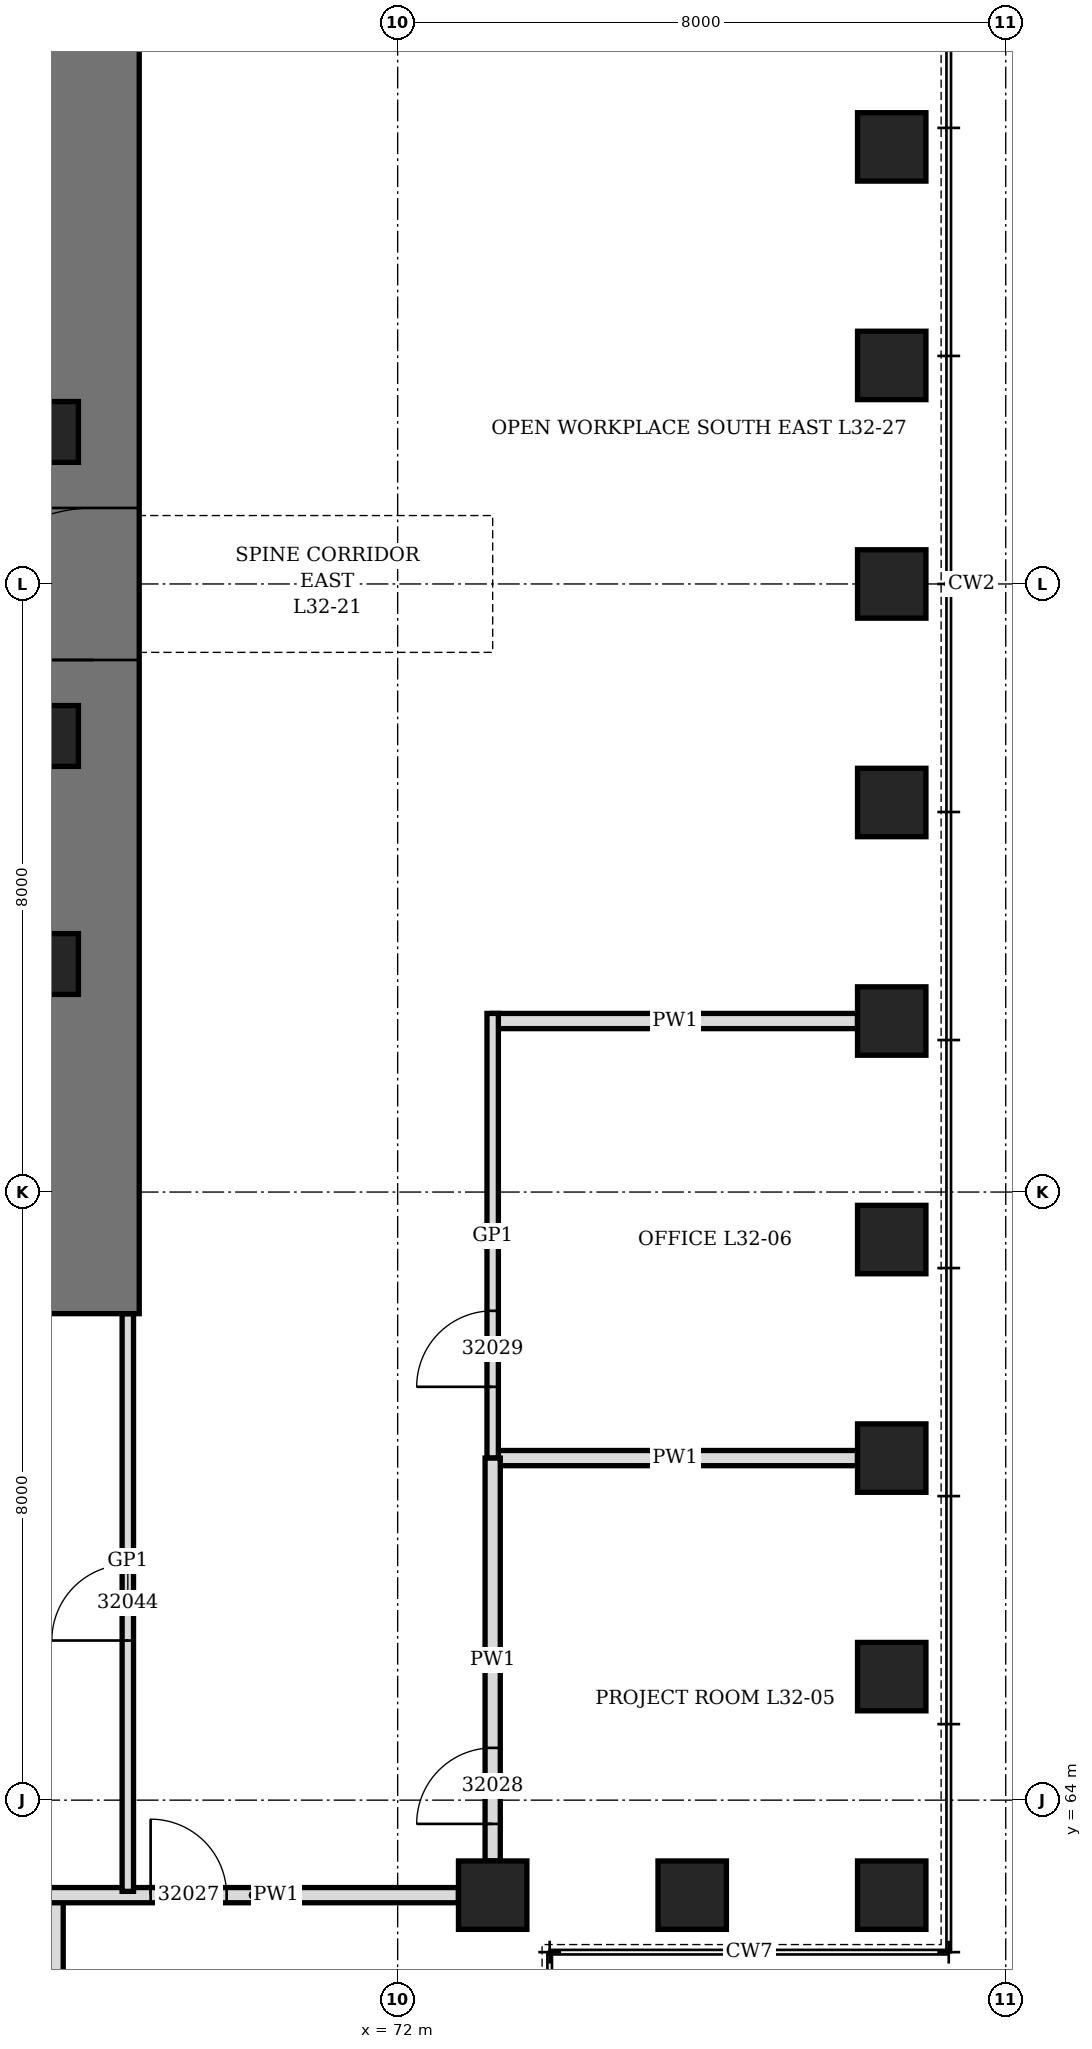
"""IFC4 building model, lengths in metres.
Left out: names, types, materials, properties, quantities, classifications, styles, units other than length and angle.
Written with IfcOpenShell. Run it as: python <this file> out.ifc"""

import sys

from ifc_helpers import new_model, si_unit, direction, frame, frame_2d, origin, origin_2d, place, context, subcontext, project, spatial, rectangle, hollow_rectangle, extrude, element, fill, save


model = new_model("IFC4")
c1 = context("Model", 3, precision=1e-05, world=origin(), true_north=direction((0.0, 1.0)))
c2 = subcontext(c1, "Body", "Model", "MODEL_VIEW")
j1 = project(units=[si_unit("LENGTHUNIT", "METRE"), si_unit("PLANEANGLEUNIT", "RADIAN")], contexts=[c1])
p1 = place(None, origin())
s1 = spatial("IfcSite", under=j1, at=p1, CompositionType="ELEMENT")
p2 = place(p1, origin())
s2 = spatial("IfcBuilding", under=s1, at=p2, CompositionType="ELEMENT")
p3 = place(p2, frame((0.0, 0.0, 145.9)))
s3 = spatial("IfcBuildingStorey", under=s2, at=p3, CompositionType="ELEMENT", Elevation=145.9)
for number, where, z_axis, x_axis in (
    (1, (73.25, 62.75, 0.0), (0.0, 0.0, 1.0), (1.0, 0.0, 0.0)),
    (2, (75.875, 62.75, 0.0), (0.0, 0.0, 1.0), (1.0, 0.0, 0.0)),
    (3, (78.5, 62.75, 0.0), (0.0, 0.0, 1.0), (0.0, 1.0, 0.0)),
    (4, (78.5, 65.625, 0.0), (0.0, 0.0, 1.0), (0.0, 1.0, 0.0)),
    (5, (78.5, 68.5, 0.0), (0.0, 0.0, 1.0), (0.0, 1.0, 0.0)),
    (6, (78.5, 71.375, 0.0), (0.0, 0.0, 1.0), (0.0, 1.0, 0.0)),
    (7, (78.5, 74.25, 0.0), (0.0, 0.0, 1.0), (0.0, 1.0, 0.0)),
    (8, (78.5, 77.125, 0.0), (0.0, 0.0, 1.0), (0.0, 1.0, 0.0)),
    (9, (78.5, 80.0, 0.0), (0.0, 0.0, 1.0), (0.0, 1.0, 0.0)),
    (10, (78.5, 82.875, 0.0), (0.0, 0.0, 1.0), (0.0, 1.0, 0.0)),
    (11, (78.5, 85.75, 0.0), (0.0, 0.0, 1.0), (0.0, 1.0, 0.0)),
):
    element("IfcColumn", number, at=place(p3, frame(where, z_axis=z_axis, x_axis=x_axis)), inside=s3, PredefinedType="COLUMN", context=c2, shape_type="SweptSolid", body=[
        extrude(hollow_rectangle(XDim=0.9, YDim=0.9, WallThickness=0.12, at=origin_2d()), origin(), (0.0, 0.0, 1.0), 4.2),
    ])
p4 = place(p3, frame((68.0, 70.4, 0.0), z_axis=(0.0, 0.0, 1.0), x_axis=(0.0, 1.0, 0.0)))
e12 = element("IfcWall", 12, at=p4, inside=s3, PredefinedType="SHEAR", context=c2, shape_type="SweptSolid", body=[
    extrude(rectangle(XDim=19.2, YDim=1.2, at=frame_2d((9.6, 0.0))), origin(), (0.0, 0.0, 1.0), 4.2),
])
p5 = place(p4, frame((8.6, 0.0, 0.0)))
e13 = element("IfcOpeningElement", 13, at=p5, cuts=e12, PredefinedType="OPENING", context=c2, shape_type="SweptSolid", body=[
    extrude(rectangle(XDim=2.0, YDim=2.4, at=frame_2d((1.0, 1.2))), frame((0.0, 0.61, 0.0), z_axis=(0.0, -1.0, 0.0), x_axis=(1.0, 0.0, 0.0)), (0.0, 0.0, 1.0), 1.22),
])
for number, where, z_axis, x_axis in (
    (14, (67.4, 75.0, 0.0), (0.0, 0.0, 1.0), (1.0, 0.0, 0.0)),
    (15, (67.4, 78.0, 0.0), (0.0, 0.0, 1.0), (1.0, 0.0, 0.0)),
    (16, (67.4, 82.0, 0.0), (0.0, 0.0, 1.0), (1.0, 0.0, 0.0)),
):
    element("IfcColumn", number, at=place(p3, frame(where, z_axis=z_axis, x_axis=x_axis)), inside=s3, PredefinedType="COLUMN", context=c2, shape_type="SweptSolid", body=[
        extrude(hollow_rectangle(XDim=0.8, YDim=0.8, WallThickness=0.1, at=origin_2d()), origin(), (0.0, 0.0, 1.0), 4.2),
    ])
p6 = place(p3, frame((67.5, 57.95, 0.0), z_axis=(0.0, 0.0, 1.0), x_axis=(0.0, 1.0, 0.0)))
e17 = element("IfcWall", 17, at=p6, inside=s3, PredefinedType="PARTITIONING", context=c2, shape_type="SweptSolid", body=[
    extrude(rectangle(XDim=4.8, YDim=0.2, at=frame_2d((2.4, 0.0))), origin(), (0.0, 0.0, 1.0), 2.74),
])
for number, where, z_axis, x_axis in (
    (18, (73.25, 68.5, 0.0), (0.0, 0.0, 1.0), (1.0, 0.0, 0.0)),
    (19, (73.25, 74.25, 0.0), (0.0, 0.0, 1.0), (1.0, 0.0, 0.0)),
):
    element("IfcWall", number, at=place(p3, frame(where, z_axis=z_axis, x_axis=x_axis)), inside=s3, PredefinedType="PARTITIONING", context=c2, shape_type="SweptSolid", body=[
        extrude(rectangle(XDim=4.8, YDim=0.2, at=frame_2d((2.4, 0.0))), origin(), (0.0, 0.0, 1.0), 3.428),
    ])
p7 = place(p3, frame((67.4, 62.75, 0.0), z_axis=(0.0, 0.0, 1.0), x_axis=(1.0, 0.0, 0.0)))
e20 = element("IfcWall", 20, at=p7, inside=s3, PredefinedType="PARTITIONING", context=c2, shape_type="SweptSolid", body=[
    extrude(rectangle(XDim=5.4, YDim=0.2, at=frame_2d((2.7, 0.0))), origin(), (0.0, 0.0, 1.0), 4.04),
])
p8 = place(p7, frame((1.35, 0.0, 0.0)))
e21 = element("IfcOpeningElement", 21, at=p8, cuts=e20, PredefinedType="OPENING", context=c2, shape_type="SweptSolid", body=[
    extrude(rectangle(XDim=1.0, YDim=2.1, at=frame_2d((0.5, 1.05))), frame((0.0, 0.11, 0.0), z_axis=(0.0, -1.0, 0.0), x_axis=(1.0, 0.0, 0.0)), (0.0, 0.0, 1.0), 0.22),
])
p9 = place(p3, frame((68.45, 62.8, 0.0), z_axis=(0.0, 0.0, 1.0), x_axis=(0.0, 1.0, 0.0)))
e22 = element("IfcWall", 22, at=p9, inside=s3, PredefinedType="PARTITIONING", context=c2, shape_type="SweptSolid", body=[
    extrude(rectangle(XDim=7.6, YDim=0.15, at=frame_2d((3.8, 0.0))), origin(), (0.0, 0.0, 1.0), 4.04),
])
p10 = place(p9, frame((3.3, 0.0, 0.0)))
e23 = element("IfcOpeningElement", 23, at=p10, cuts=e22, PredefinedType="OPENING", context=c2, shape_type="SweptSolid", body=[
    extrude(rectangle(XDim=1.0, YDim=2.4, at=frame_2d((0.5, 1.2))), frame((0.0, 0.085, 0.0), z_axis=(0.0, -1.0, 0.0), x_axis=(1.0, 0.0, 0.0)), (0.0, 0.0, 1.0), 0.17),
])
p11 = place(p3, frame((73.25, 68.5, 0.0), z_axis=(0.0, 0.0, 1.0), x_axis=(0.0, 1.0, 0.0)))
e24 = element("IfcWall", 24, at=p11, inside=s3, PredefinedType="PARTITIONING", context=c2, shape_type="SweptSolid", body=[
    extrude(rectangle(XDim=5.85, YDim=0.15, at=frame_2d((2.925, 0.0))), origin(), (0.0, 0.0, 1.0), 4.04),
])
p12 = place(p11, frame((0.938, 0.0, 0.0)))
e25 = element("IfcOpeningElement", 25, at=p12, cuts=e24, PredefinedType="OPENING", context=c2, shape_type="SweptSolid", body=[
    extrude(rectangle(XDim=1.0, YDim=2.1, at=frame_2d((0.5, 1.05))), frame((0.0, 0.085, 0.0), z_axis=(0.0, -1.0, 0.0), x_axis=(1.0, 0.0, 0.0)), (0.0, 0.0, 1.0), 0.17),
])
p13 = place(p3, frame((73.25, 63.2, 0.0), z_axis=(0.0, 0.0, 1.0), x_axis=(0.0, 1.0, 0.0)))
e26 = element("IfcWall", 26, at=p13, inside=s3, PredefinedType="PARTITIONING", context=c2, shape_type="SweptSolid", body=[
    extrude(rectangle(XDim=5.3, YDim=0.2, at=frame_2d((2.65, 0.0))), origin(), (0.0, 0.0, 1.0), 4.04),
])
p14 = place(p13, frame((0.488, 0.0, 0.0)))
e27 = element("IfcOpeningElement", 27, at=p14, cuts=e26, PredefinedType="OPENING", context=c2, shape_type="SweptSolid", body=[
    extrude(rectangle(XDim=1.0, YDim=2.1, at=frame_2d((0.5, 1.05))), frame((0.0, 0.11, 0.0), z_axis=(0.0, -1.0, 0.0), x_axis=(1.0, 0.0, 0.0)), (0.0, 0.0, 1.0), 0.22),
])
p15 = place(p5, origin())
e28 = element("IfcDoor", 28, at=p15, inside=s3, OperationType="DOUBLE_DOOR_SINGLE_SWING", PredefinedType="DOOR", context=c2, shape_type="SweptSolid", body=[
    extrude(rectangle(XDim=2.0, YDim=2.4, at=frame_2d((1.0, 1.2))), frame((0.0, 0.35, 0.0), z_axis=(0.0, -1.0, 0.0), x_axis=(1.0, 0.0, 0.0)), (0.0, 0.0, 1.0), 0.7),
])
fill(e13, e28)
p16 = place(p8, origin())
e29 = element("IfcDoor", 29, at=p16, inside=s3, OperationType="SINGLE_SWING_LEFT", PredefinedType="DOOR", context=c2, shape_type="SweptSolid", body=[
    extrude(rectangle(XDim=1.0, YDim=2.1, at=frame_2d((0.5, 1.05))), frame((0.0, 0.1, 0.0), z_axis=(0.0, -1.0, 0.0), x_axis=(1.0, 0.0, 0.0)), (0.0, 0.0, 1.0), 0.199),
])
fill(e21, e29)
p17 = place(p14, origin())
e30 = element("IfcDoor", 30, at=p17, inside=s3, OperationType="SINGLE_SWING_LEFT", PredefinedType="DOOR", context=c2, shape_type="SweptSolid", body=[
    extrude(rectangle(XDim=1.0, YDim=2.1, at=frame_2d((0.5, 1.05))), frame((0.0, 0.1, 0.0), z_axis=(0.0, -1.0, 0.0), x_axis=(1.0, 0.0, 0.0)), (0.0, 0.0, 1.0), 0.199),
])
fill(e27, e30)
p18 = place(p12, origin())
e31 = element("IfcDoor", 31, at=p18, inside=s3, OperationType="SINGLE_SWING_LEFT", PredefinedType="DOOR", context=c2, shape_type="SweptSolid", body=[
    extrude(rectangle(XDim=1.0, YDim=2.1, at=frame_2d((0.5, 1.05))), frame((0.0, 0.075, 0.0), z_axis=(0.0, -1.0, 0.0), x_axis=(1.0, 0.0, 0.0)), (0.0, 0.0, 1.0), 0.149),
])
fill(e25, e31)
p19 = place(p10, origin())
e32 = element("IfcDoor", 32, at=p19, inside=s3, OperationType="SINGLE_SWING_RIGHT", PredefinedType="DOOR", context=c2, shape_type="SweptSolid", body=[
    extrude(rectangle(XDim=1.0, YDim=2.4, at=frame_2d((0.5, 1.2))), frame((0.0, 0.075, 0.0), z_axis=(0.0, -1.0, 0.0), x_axis=(1.0, 0.0, 0.0)), (0.0, 0.0, 1.0), 0.149),
])
fill(e23, e32)
save(model, sys.argv[1])
